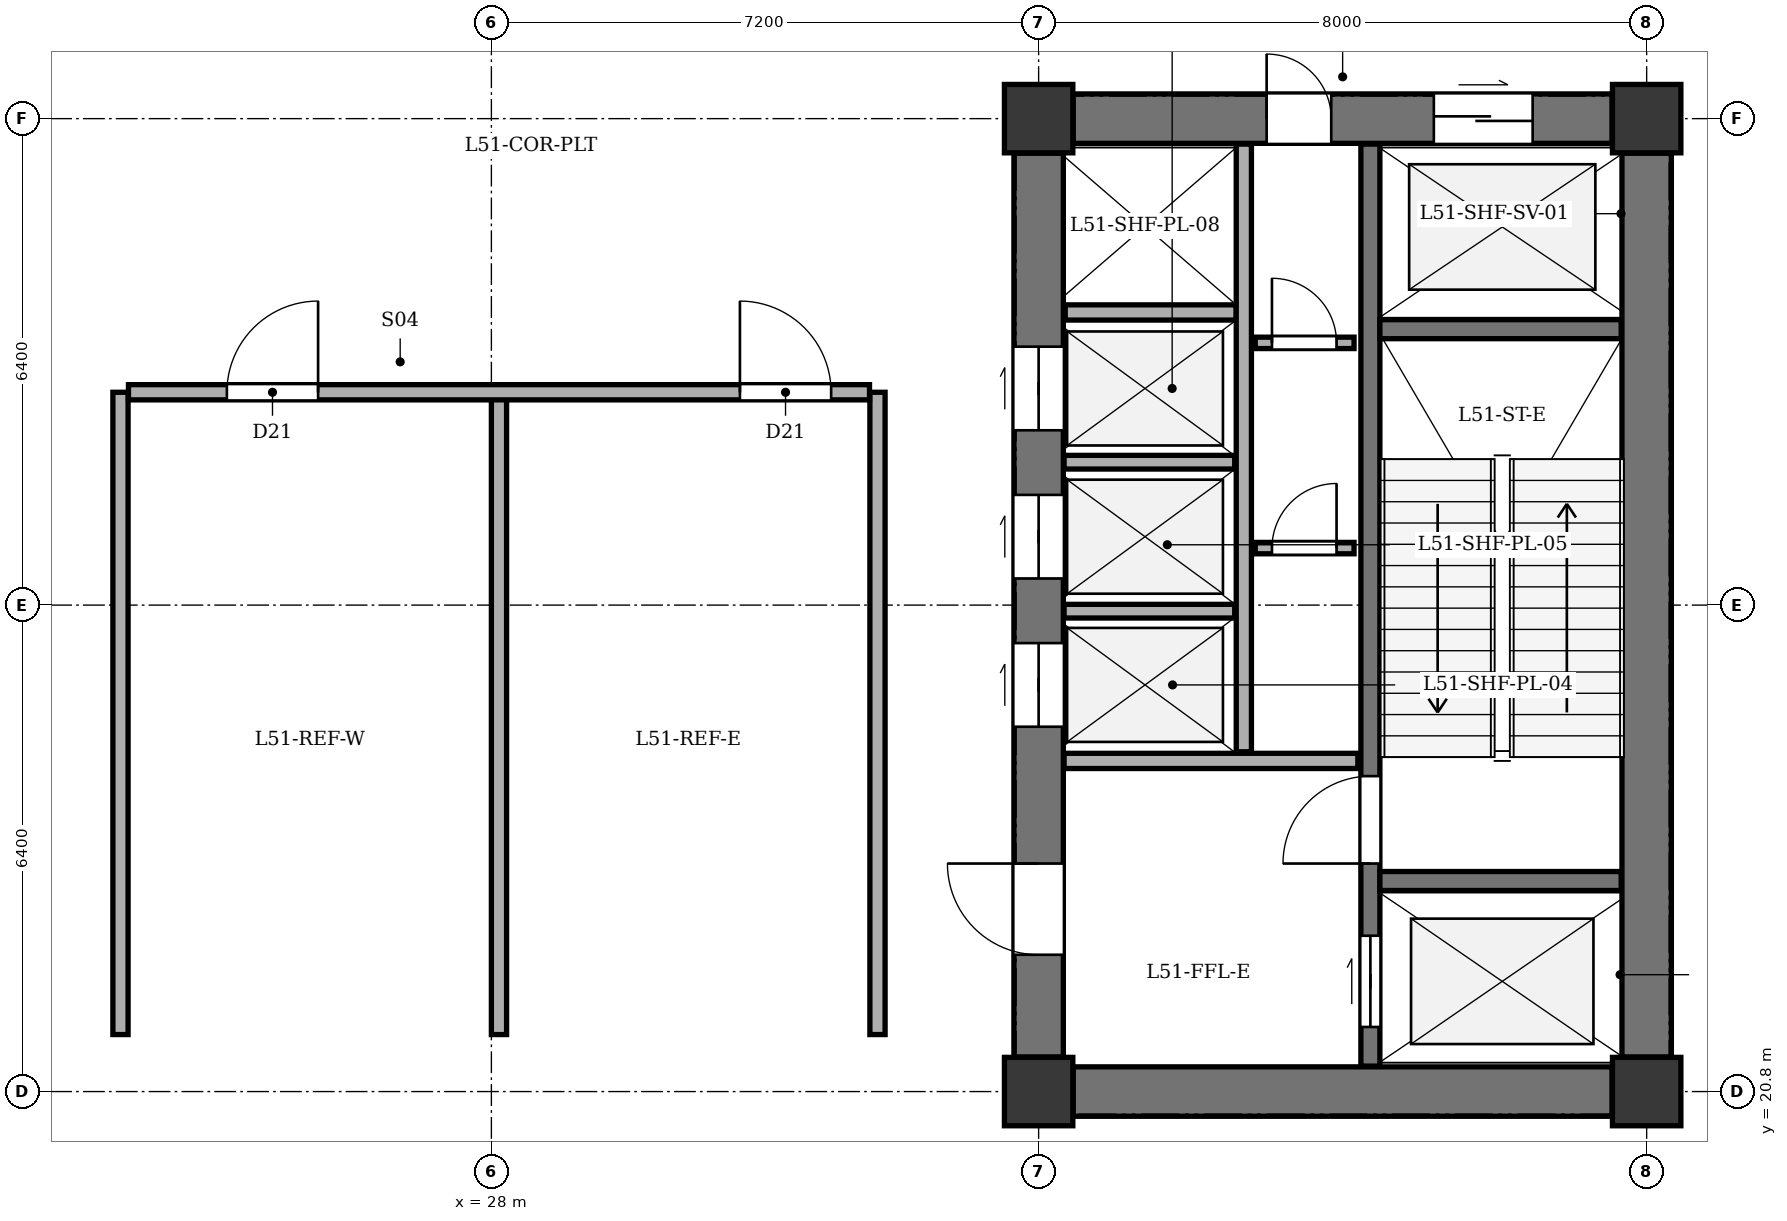
"""IFC4 building model, lengths in metres.
Left out: names, types, materials, properties, quantities, classifications, styles, units other than length and angle.
Written with IfcOpenShell. Run it as: python <this file> out.ifc"""

import sys

from ifc_helpers import new_model, si_unit, direction, frame, frame_2d, origin, origin_2d, place, context, subcontext, project, spatial, rectangle, extrude, element, fill, save


model = new_model("IFC4")
c1 = context("Model", 3, precision=1e-05, world=origin(), true_north=direction((0.0, 1.0)))
c2 = subcontext(c1, "Body", "Model", "MODEL_VIEW")
j1 = project(units=[si_unit("LENGTHUNIT", "METRE"), si_unit("PLANEANGLEUNIT", "RADIAN")], contexts=[c1])
p1 = place(None, origin())
s1 = spatial("IfcSite", under=j1, at=p1, CompositionType="ELEMENT")
p2 = place(p1, origin())
s2 = spatial("IfcBuilding", under=s1, at=p2, CompositionType="ELEMENT")
p3 = place(p2, frame((0.0, 0.0, 197.3)))
s3 = spatial("IfcBuildingStorey", under=s2, at=p3, CompositionType="ELEMENT", Elevation=197.3)
for number, where, z_axis, x_axis in (
    (1, (35.2, 20.8, 0.0), (0.0, 0.0, 1.0), (1.0, 0.0, 0.0)),
    (2, (43.2, 20.8, 0.0), (0.0, 0.0, 1.0), (1.0, 0.0, 0.0)),
    (3, (35.2, 33.6, 0.0), (0.0, 0.0, 1.0), (1.0, 0.0, 0.0)),
    (4, (43.2, 33.6, 0.0), (0.0, 0.0, 1.0), (1.0, 0.0, 0.0)),
):
    element("IfcColumn", number, at=place(p3, frame(where, z_axis=z_axis, x_axis=x_axis)), inside=s3, PredefinedType="COLUMN", context=c2, shape_type="SweptSolid", body=[
        extrude(rectangle(XDim=0.9, YDim=0.9, at=origin_2d()), origin(), (0.0, 0.0, 1.0), 5.4),
    ])
p4 = place(p3, frame((43.2, 21.255, 0.0), z_axis=(0.0, 0.0, 1.0), x_axis=(0.0, 1.0, 0.0)))
e5 = element("IfcWall", 5, at=p4, inside=s3, PredefinedType="SHEAR", context=c2, shape_type="SweptSolid", body=[
    extrude(rectangle(XDim=11.89, YDim=0.65, at=frame_2d((5.945, 0.0))), origin(), (0.0, 0.0, 1.0), 5.04),
])
p5 = place(p3, frame((35.655, 20.8, 0.0), z_axis=(0.0, 0.0, 1.0), x_axis=(1.0, 0.0, 0.0)))
e6 = element("IfcWall", 6, at=p5, inside=s3, PredefinedType="SHEAR", context=c2, shape_type="SweptSolid", body=[
    extrude(rectangle(XDim=7.09, YDim=0.65, at=frame_2d((3.545, 0.0))), origin(), (0.0, 0.0, 1.0), 5.04),
])
p6 = place(p3, frame((35.655, 33.6, 0.0), z_axis=(0.0, 0.0, 1.0), x_axis=(1.0, 0.0, 0.0)))
e7 = element("IfcWall", 7, at=p6, inside=s3, PredefinedType="SHEAR", context=c2, shape_type="SweptSolid", body=[
    extrude(rectangle(XDim=7.09, YDim=0.65, at=frame_2d((3.545, 0.0))), origin(), (0.0, 0.0, 1.0), 5.04),
])
p7 = place(p6, frame((4.745, 0.0, 0.0)))
e8 = element("IfcOpeningElement", 8, at=p7, cuts=e7, PredefinedType="OPENING", context=c2, shape_type="SweptSolid", body=[
    extrude(rectangle(XDim=1.3, YDim=2.15, at=frame_2d((0.65, 1.075))), frame((0.0, 0.335, 0.0), z_axis=(0.0, -1.0, 0.0), x_axis=(1.0, 0.0, 0.0)), (0.0, 0.0, 1.0), 0.67),
])
p8 = place(p6, frame((2.545, 0.0, 0.0)))
e9 = element("IfcOpeningElement", 9, at=p8, cuts=e7, PredefinedType="OPENING", context=c2, shape_type="SweptSolid", body=[
    extrude(rectangle(XDim=0.85, YDim=2.02, at=frame_2d((0.425, 1.01))), frame((0.0, 0.335, 0.0), z_axis=(0.0, -1.0, 0.0), x_axis=(1.0, 0.0, 0.0)), (0.0, 0.0, 1.0), 0.67),
])
p9 = place(p3, frame((35.2, 21.255, 0.0), z_axis=(0.0, 0.0, 1.0), x_axis=(0.0, 1.0, 0.0)))
e10 = element("IfcWall", 10, at=p9, inside=s3, PredefinedType="SHEAR", context=c2, shape_type="SweptSolid", body=[
    extrude(rectangle(XDim=11.89, YDim=0.65, at=frame_2d((5.945, 0.0))), origin(), (0.0, 0.0, 1.0), 5.04),
])
p10 = place(p9, frame((1.345, 0.0, 0.0)))
e11 = element("IfcOpeningElement", 11, at=p10, cuts=e10, PredefinedType="OPENING", context=c2, shape_type="SweptSolid", body=[
    extrude(rectangle(XDim=1.2, YDim=2.15, at=frame_2d((0.6, 1.075))), frame((0.0, 0.335, 0.0), z_axis=(0.0, -1.0, 0.0), x_axis=(1.0, 0.0, 0.0)), (0.0, 0.0, 1.0), 0.67),
])
p11 = place(p9, frame((4.345, 0.0, 0.0)))
e12 = element("IfcOpeningElement", 12, at=p11, cuts=e10, PredefinedType="OPENING", context=c2, shape_type="SweptSolid", body=[
    extrude(rectangle(XDim=1.1, YDim=2.1, at=frame_2d((0.55, 1.05))), frame((0.0, 0.335, 0.0), z_axis=(0.0, -1.0, 0.0), x_axis=(1.0, 0.0, 0.0)), (0.0, 0.0, 1.0), 0.67),
])
p12 = place(p9, frame((6.295, 0.0, 0.0)))
e13 = element("IfcOpeningElement", 13, at=p12, cuts=e10, PredefinedType="OPENING", context=c2, shape_type="SweptSolid", body=[
    extrude(rectangle(XDim=1.1, YDim=2.1, at=frame_2d((0.55, 1.05))), frame((0.0, 0.335, 0.0), z_axis=(0.0, -1.0, 0.0), x_axis=(1.0, 0.0, 0.0)), (0.0, 0.0, 1.0), 0.67),
])
p13 = place(p9, frame((8.245, 0.0, 0.0)))
e14 = element("IfcOpeningElement", 14, at=p13, cuts=e10, PredefinedType="OPENING", context=c2, shape_type="SweptSolid", body=[
    extrude(rectangle(XDim=1.1, YDim=2.1, at=frame_2d((0.55, 1.05))), frame((0.0, 0.335, 0.0), z_axis=(0.0, -1.0, 0.0), x_axis=(1.0, 0.0, 0.0)), (0.0, 0.0, 1.0), 0.67),
])
p14 = place(p3, frame((39.565, 21.135, 0.0), z_axis=(0.0, 0.0, 1.0), x_axis=(0.0, 1.0, 0.0)))
e15 = element("IfcWall", 15, at=p14, inside=s3, PredefinedType="SHEAR", context=c2, shape_type="SweptSolid", body=[
    extrude(rectangle(XDim=12.13, YDim=0.25, at=frame_2d((6.065, 0.0))), origin(), (0.0, 0.0, 1.0), 5.04),
])
p15 = place(p14, frame((0.515, 0.0, 0.0)))
e16 = element("IfcOpeningElement", 16, at=p15, cuts=e15, PredefinedType="OPENING", context=c2, shape_type="SweptSolid", body=[
    extrude(rectangle(XDim=1.2, YDim=2.15, at=frame_2d((0.6, 1.075))), frame((0.0, 0.135, 0.0), z_axis=(0.0, -1.0, 0.0), x_axis=(1.0, 0.0, 0.0)), (0.0, 0.0, 1.0), 0.27),
])
p16 = place(p14, frame((2.665, 0.0, 0.0)))
e17 = element("IfcOpeningElement", 17, at=p16, cuts=e15, PredefinedType="OPENING", context=c2, shape_type="SweptSolid", body=[
    extrude(rectangle(XDim=1.15, YDim=2.15, at=frame_2d((0.575, 1.075))), frame((0.0, 0.135, 0.0), z_axis=(0.0, -1.0, 0.0), x_axis=(1.0, 0.0, 0.0)), (0.0, 0.0, 1.0), 0.27),
])
for number, where, z_axis, x_axis in (
    (18, (39.69, 23.57, 0.0), (0.0, 0.0, 1.0), (1.0, 0.0, 0.0)),
    (19, (39.69, 30.83, 0.0), (0.0, 0.0, 1.0), (1.0, 0.0, 0.0)),
):
    element("IfcWall", number, at=place(p3, frame(where, z_axis=z_axis, x_axis=x_axis)), inside=s3, PredefinedType="SHEAR", context=c2, shape_type="SweptSolid", body=[
        extrude(rectangle(XDim=3.175, YDim=0.25, at=frame_2d((1.587, 0.0))), origin(), (0.0, 0.0, 1.0), 5.04),
    ])
p17 = place(p3, frame((35.535, 25.15, 0.0), z_axis=(0.0, 0.0, 1.0), x_axis=(1.0, 0.0, 0.0)))
e20 = element("IfcWall", 20, at=p17, inside=s3, PredefinedType="SOLIDWALL", context=c2, shape_type="SweptSolid", body=[
    extrude(rectangle(XDim=3.865, YDim=0.2, at=frame_2d((1.933, 0.0))), origin(), (0.0, 0.0, 1.0), 5.04),
])
p18 = place(p3, frame((35.55, 31.05, 0.0), z_axis=(0.0, 0.0, 1.0), x_axis=(1.0, 0.0, 0.0)))
e21 = element("IfcWall", 21, at=p18, inside=s3, PredefinedType="SOLIDWALL", context=c2, shape_type="SweptSolid", body=[
    extrude(rectangle(XDim=2.25, YDim=0.2, at=frame_2d((1.125, 0.0))), origin(), (0.0, 0.0, 1.0), 5.04),
])
p19 = place(p3, frame((37.9, 25.27, 0.0), z_axis=(0.0, 0.0, 1.0), x_axis=(0.0, 1.0, 0.0)))
e22 = element("IfcWall", 22, at=p19, inside=s3, PredefinedType="SOLIDWALL", context=c2, shape_type="SweptSolid", body=[
    extrude(rectangle(XDim=7.995, YDim=0.2, at=frame_2d((3.998, 0.0))), origin(), (0.0, 0.0, 1.0), 5.04),
])
for number, where, z_axis, x_axis in (
    (23, (35.535, 27.12, 0.0), (0.0, 0.0, 1.0), (1.0, 0.0, 0.0)),
    (24, (35.535, 29.08, 0.0), (0.0, 0.0, 1.0), (1.0, 0.0, 0.0)),
):
    element("IfcWall", number, at=place(p3, frame(where, z_axis=z_axis, x_axis=x_axis)), inside=s3, PredefinedType="PARTITIONING", context=c2, shape_type="SweptSolid", body=[
        extrude(rectangle(XDim=2.245, YDim=0.18, at=frame_2d((1.123, 0.0))), origin(), (0.0, 0.0, 1.0), 5.04),
    ])
p20 = place(p3, frame((38.05, 27.95, 0.0), z_axis=(0.0, 0.0, 1.0), x_axis=(1.0, 0.0, 0.0)))
e25 = element("IfcWall", 25, at=p20, inside=s3, PredefinedType="PARTITIONING", context=c2, shape_type="SweptSolid", body=[
    extrude(rectangle(XDim=1.3, YDim=0.15, at=frame_2d((0.65, 0.0))), origin(), (0.0, 0.0, 1.0), 5.04),
])
p21 = place(p20, frame((0.22, 0.0, 0.0)))
e26 = element("IfcOpeningElement", 26, at=p21, cuts=e25, PredefinedType="OPENING", context=c2, shape_type="SweptSolid", body=[
    extrude(rectangle(XDim=0.85, YDim=2.02, at=frame_2d((0.425, 1.01))), frame((0.0, 0.085, 0.0), z_axis=(0.0, -1.0, 0.0), x_axis=(1.0, 0.0, 0.0)), (0.0, 0.0, 1.0), 0.17),
])
p22 = place(p3, frame((38.05, 30.65, 0.0), z_axis=(0.0, 0.0, 1.0), x_axis=(1.0, 0.0, 0.0)))
e27 = element("IfcWall", 27, at=p22, inside=s3, PredefinedType="PARTITIONING", context=c2, shape_type="SweptSolid", body=[
    extrude(rectangle(XDim=1.3, YDim=0.15, at=frame_2d((0.65, 0.0))), origin(), (0.0, 0.0, 1.0), 5.04),
])
p23 = place(p22, frame((0.22, 0.0, 0.0)))
e28 = element("IfcOpeningElement", 28, at=p23, cuts=e27, PredefinedType="OPENING", context=c2, shape_type="SweptSolid", body=[
    extrude(rectangle(XDim=0.85, YDim=2.02, at=frame_2d((0.425, 1.01))), frame((0.0, 0.085, 0.0), z_axis=(0.0, -1.0, 0.0), x_axis=(1.0, 0.0, 0.0)), (0.0, 0.0, 1.0), 0.17),
])
for number, where, z_axis, x_axis in (
    (29, (23.12, 21.55, 0.0), (0.0, 0.0, 1.0), (0.0, 1.0, 0.0)),
    (30, (33.08, 21.55, 0.0), (0.0, 0.0, 1.0), (0.0, 1.0, 0.0)),
):
    element("IfcWall", number, at=place(p3, frame(where, z_axis=z_axis, x_axis=x_axis)), inside=s3, PredefinedType="SOLIDWALL", context=c2, shape_type="SweptSolid", body=[
        extrude(rectangle(XDim=8.45, YDim=0.2, at=frame_2d((4.225, 0.0))), origin(), (0.0, 0.0, 1.0), 5.04),
    ])
p24 = place(p3, frame((28.1, 21.55, 0.0), z_axis=(0.0, 0.0, 1.0), x_axis=(0.0, 1.0, 0.0)))
e31 = element("IfcWall", 31, at=p24, inside=s3, PredefinedType="SOLIDWALL", context=c2, shape_type="SweptSolid", body=[
    extrude(rectangle(XDim=8.45, YDim=0.2, at=frame_2d((4.225, 0.0))), origin(), (0.0, 0.0, 1.0), 4.375),
])
p25 = place(p3, frame((23.225, 30.0, 0.0), z_axis=(0.0, 0.0, 1.0), x_axis=(1.0, 0.0, 0.0)))
e32 = element("IfcWall", 32, at=p25, inside=s3, PredefinedType="SOLIDWALL", context=c2, shape_type="SweptSolid", body=[
    extrude(rectangle(XDim=9.75, YDim=0.2, at=frame_2d((4.875, 0.0))), origin(), (0.0, 0.0, 1.0), 5.04),
])
p26 = place(p25, frame((1.295, 0.0, 0.0)))
e33 = element("IfcOpeningElement", 33, at=p26, cuts=e32, PredefinedType="OPENING", context=c2, shape_type="SweptSolid", body=[
    extrude(rectangle(XDim=1.2, YDim=2.15, at=frame_2d((0.6, 1.075))), frame((0.0, 0.11, 0.0), z_axis=(0.0, -1.0, 0.0), x_axis=(1.0, 0.0, 0.0)), (0.0, 0.0, 1.0), 0.22),
])
p27 = place(p25, frame((8.045, 0.0, 0.0)))
e34 = element("IfcOpeningElement", 34, at=p27, cuts=e32, PredefinedType="OPENING", context=c2, shape_type="SweptSolid", body=[
    extrude(rectangle(XDim=1.2, YDim=2.15, at=frame_2d((0.6, 1.075))), frame((0.0, 0.11, 0.0), z_axis=(0.0, -1.0, 0.0), x_axis=(1.0, 0.0, 0.0)), (0.0, 0.0, 1.0), 0.22),
])
p28 = place(p7, origin())
e35 = element("IfcDoor", 35, at=p28, inside=s3, OperationType="DOUBLE_DOOR_SLIDING", PredefinedType="DOOR", context=c2, shape_type="SweptSolid", body=[
    extrude(rectangle(XDim=1.3, YDim=2.15, at=frame_2d((0.65, 1.075))), frame((0.0, 0.025, 0.0), z_axis=(0.0, -1.0, 0.0), x_axis=(1.0, 0.0, 0.0)), (0.0, 0.0, 1.0), 0.05),
])
fill(e8, e35)
p29 = place(p8, origin())
e36 = element("IfcDoor", 36, at=p29, inside=s3, OperationType="SINGLE_SWING_LEFT", PredefinedType="DOOR", context=c2, shape_type="SweptSolid", body=[
    extrude(rectangle(XDim=0.85, YDim=2.02, at=frame_2d((0.425, 1.01))), frame((0.0, 0.025, 0.0), z_axis=(0.0, -1.0, 0.0), x_axis=(1.0, 0.0, 0.0)), (0.0, 0.0, 1.0), 0.05),
])
fill(e9, e36)
p30 = place(p10, origin())
e37 = element("IfcDoor", 37, at=p30, inside=s3, OperationType="SINGLE_SWING_RIGHT", PredefinedType="DOOR", context=c2, shape_type="SweptSolid", body=[
    extrude(rectangle(XDim=1.2, YDim=2.15, at=frame_2d((0.6, 1.075))), frame((0.0, 0.025, 0.0), z_axis=(0.0, -1.0, 0.0), x_axis=(1.0, 0.0, 0.0)), (0.0, 0.0, 1.0), 0.05),
])
fill(e11, e37)
p31 = place(p11, origin())
e38 = element("IfcDoor", 38, at=p31, inside=s3, OperationType="DOUBLE_DOOR_SLIDING", PredefinedType="DOOR", context=c2, shape_type="SweptSolid", body=[
    extrude(rectangle(XDim=1.1, YDim=2.1, at=frame_2d((0.55, 1.05))), frame((0.0, 0.025, 0.0), z_axis=(0.0, -1.0, 0.0), x_axis=(1.0, 0.0, 0.0)), (0.0, 0.0, 1.0), 0.05),
])
fill(e12, e38)
p32 = place(p12, origin())
e39 = element("IfcDoor", 39, at=p32, inside=s3, OperationType="DOUBLE_DOOR_SLIDING", PredefinedType="DOOR", context=c2, shape_type="SweptSolid", body=[
    extrude(rectangle(XDim=1.1, YDim=2.1, at=frame_2d((0.55, 1.05))), frame((0.0, 0.025, 0.0), z_axis=(0.0, -1.0, 0.0), x_axis=(1.0, 0.0, 0.0)), (0.0, 0.0, 1.0), 0.05),
])
fill(e13, e39)
p33 = place(p13, origin())
e40 = element("IfcDoor", 40, at=p33, inside=s3, OperationType="DOUBLE_DOOR_SLIDING", PredefinedType="DOOR", context=c2, shape_type="SweptSolid", body=[
    extrude(rectangle(XDim=1.1, YDim=2.1, at=frame_2d((0.55, 1.05))), frame((0.0, 0.025, 0.0), z_axis=(0.0, -1.0, 0.0), x_axis=(1.0, 0.0, 0.0)), (0.0, 0.0, 1.0), 0.05),
])
fill(e14, e40)
p34 = place(p15, origin())
e41 = element("IfcDoor", 41, at=p34, inside=s3, OperationType="DOUBLE_DOOR_SLIDING", PredefinedType="DOOR", context=c2, shape_type="SweptSolid", body=[
    extrude(rectangle(XDim=1.2, YDim=2.15, at=frame_2d((0.6, 1.075))), frame((0.0, 0.025, 0.0), z_axis=(0.0, -1.0, 0.0), x_axis=(1.0, 0.0, 0.0)), (0.0, 0.0, 1.0), 0.05),
])
fill(e16, e41)
p35 = place(p16, origin())
e42 = element("IfcDoor", 42, at=p35, inside=s3, OperationType="SINGLE_SWING_LEFT", PredefinedType="DOOR", context=c2, shape_type="SweptSolid", body=[
    extrude(rectangle(XDim=1.15, YDim=2.15, at=frame_2d((0.575, 1.075))), frame((0.0, 0.025, 0.0), z_axis=(0.0, -1.0, 0.0), x_axis=(1.0, 0.0, 0.0)), (0.0, 0.0, 1.0), 0.05),
])
fill(e17, e42)
p36 = place(p21, origin())
e43 = element("IfcDoor", 43, at=p36, inside=s3, OperationType="SINGLE_SWING_RIGHT", PredefinedType="DOOR", context=c2, shape_type="SweptSolid", body=[
    extrude(rectangle(XDim=0.85, YDim=2.02, at=frame_2d((0.425, 1.01))), frame((0.0, 0.025, 0.0), z_axis=(0.0, -1.0, 0.0), x_axis=(1.0, 0.0, 0.0)), (0.0, 0.0, 1.0), 0.05),
])
fill(e26, e43)
p37 = place(p23, origin())
e44 = element("IfcDoor", 44, at=p37, inside=s3, OperationType="SINGLE_SWING_LEFT", PredefinedType="DOOR", context=c2, shape_type="SweptSolid", body=[
    extrude(rectangle(XDim=0.85, YDim=2.02, at=frame_2d((0.425, 1.01))), frame((0.0, 0.025, 0.0), z_axis=(0.0, -1.0, 0.0), x_axis=(1.0, 0.0, 0.0)), (0.0, 0.0, 1.0), 0.05),
])
fill(e28, e44)
p38 = place(p26, origin())
e45 = element("IfcDoor", 45, at=p38, inside=s3, OperationType="SINGLE_SWING_RIGHT", PredefinedType="DOOR", context=c2, shape_type="SweptSolid", body=[
    extrude(rectangle(XDim=1.2, YDim=2.15, at=frame_2d((0.6, 1.075))), frame((0.0, 0.025, 0.0), z_axis=(0.0, -1.0, 0.0), x_axis=(1.0, 0.0, 0.0)), (0.0, 0.0, 1.0), 0.05),
])
fill(e33, e45)
p39 = place(p27, origin())
e46 = element("IfcDoor", 46, at=p39, inside=s3, OperationType="SINGLE_SWING_LEFT", PredefinedType="DOOR", context=c2, shape_type="SweptSolid", body=[
    extrude(rectangle(XDim=1.2, YDim=2.15, at=frame_2d((0.6, 1.075))), frame((0.0, 0.025, 0.0), z_axis=(0.0, -1.0, 0.0), x_axis=(1.0, 0.0, 0.0)), (0.0, 0.0, 1.0), 0.05),
])
fill(e34, e46)
save(model, sys.argv[1])
